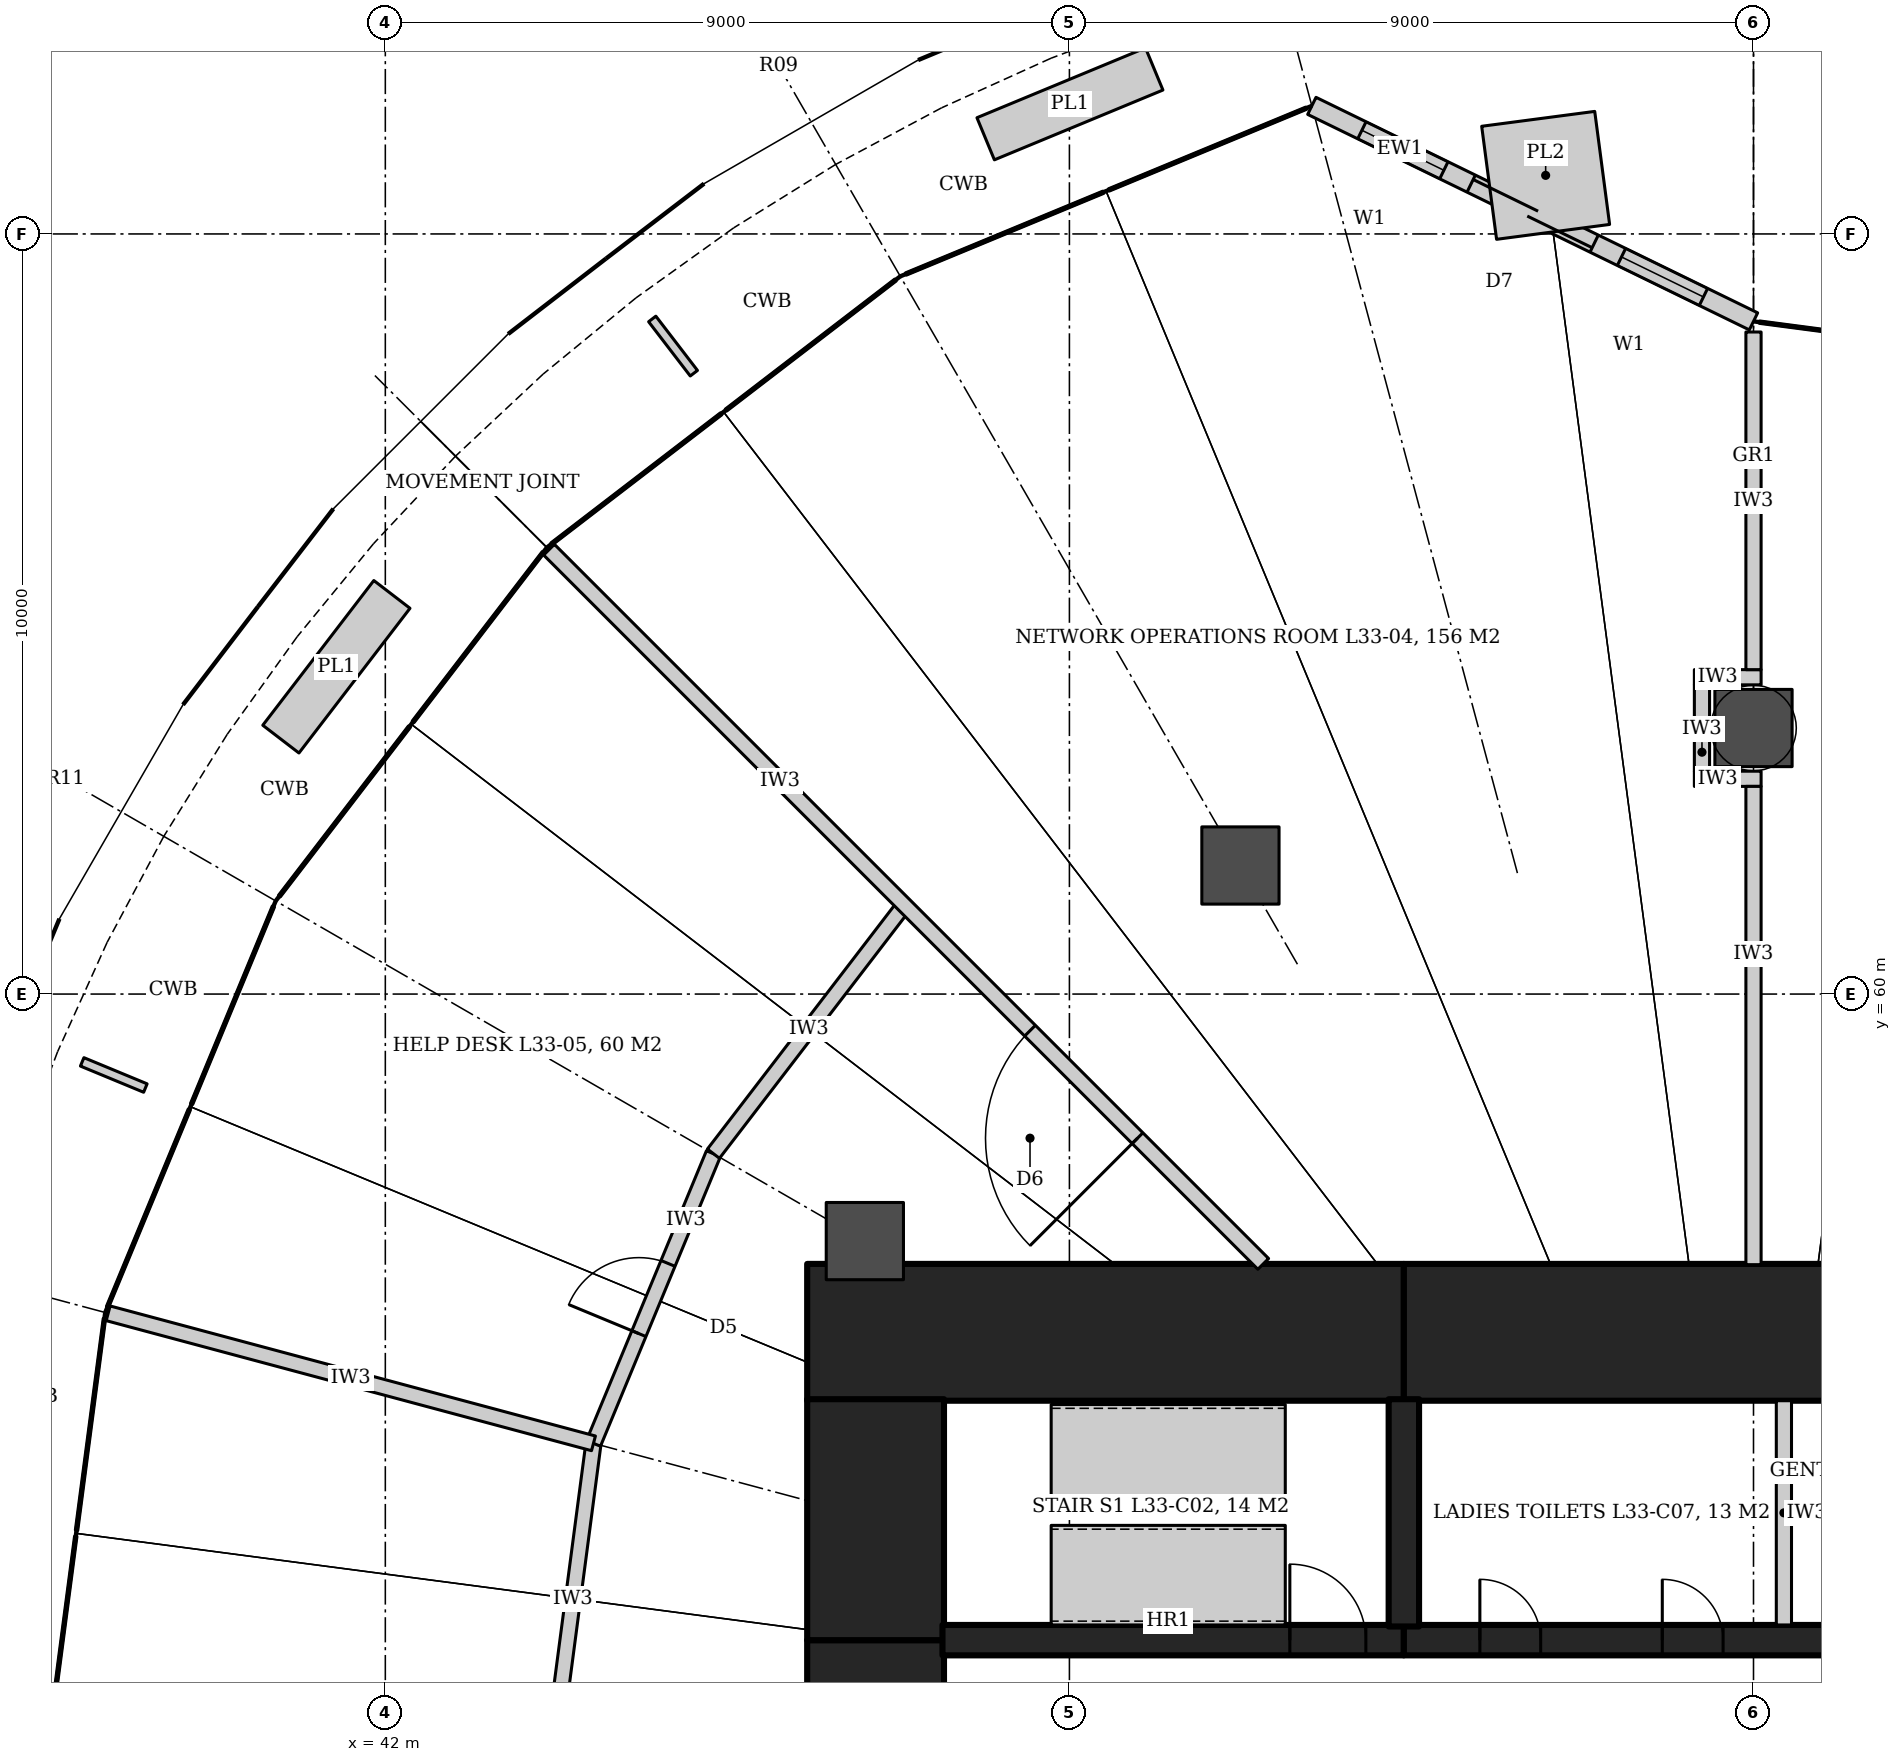
"""IFC4 building model, lengths in metres.
Left out: names, types, materials, properties, quantities, classifications, styles, units other than length and angle.
Written with IfcOpenShell. Run it as: python <this file> out.ifc"""

import sys

from ifc_helpers import new_model, si_unit, direction, frame, frame_2d, origin, origin_2d, place, context, subcontext, project, spatial, rectangle, hollow_circle, extrude, element, fill, save


model = new_model("IFC4")
c1 = context("Model", 3, precision=1e-05, world=origin(), true_north=direction((0.0, 1.0)))
c2 = subcontext(c1, "Body", "Model", "MODEL_VIEW")
j1 = project(units=[si_unit("LENGTHUNIT", "METRE"), si_unit("PLANEANGLEUNIT", "RADIAN")], contexts=[c1])
p1 = place(None, origin())
s1 = spatial("IfcSite", under=j1, at=p1, CompositionType="ELEMENT")
p2 = place(p1, origin())
s2 = spatial("IfcBuilding", under=s1, at=p2, CompositionType="ELEMENT")
p3 = place(p2, frame((0.0, 0.0, 147.8)))
s3 = spatial("IfcBuildingStorey", under=s2, at=p3, CompositionType="ELEMENT", Elevation=147.8)
p4 = place(p3, frame((47.55, 55.55, 0.0), z_axis=(0.0, 0.0, 1.0), x_axis=(1.0, 0.0, 0.0)))
e1 = element("IfcWall", 1, at=p4, inside=s3, PredefinedType="SHEAR", context=c2, shape_type="SweptSolid", body=[
    extrude(rectangle(XDim=7.85, YDim=1.8, at=frame_2d((3.925, 0.0))), origin(), (0.0, 0.0, 1.0), 4.2),
])
p5 = place(p3, frame((55.4, 55.55, 0.0), z_axis=(0.0, 0.0, 1.0), x_axis=(1.0, 0.0, 0.0)))
e2 = element("IfcWall", 2, at=p5, inside=s3, PredefinedType="SHEAR", context=c2, shape_type="SweptSolid", body=[
    extrude(rectangle(XDim=9.2, YDim=1.8, at=frame_2d((4.6, 0.0))), origin(), (0.0, 0.0, 1.0), 4.2),
])
p6 = place(p3, frame((48.45, 48.5, 0.0), z_axis=(0.0, 0.0, 1.0), x_axis=(0.0, 1.0, 0.0)))
e3 = element("IfcWall", 3, at=p6, inside=s3, PredefinedType="SHEAR", context=c2, shape_type="SweptSolid", body=[
    extrude(rectangle(XDim=3.0, YDim=1.8, at=frame_2d((1.5, 0.0))), origin(), (0.0, 0.0, 1.0), 4.2),
])
p7 = place(p6, frame((0.6, 0.0, 0.0)))
e4 = element("IfcOpeningElement", 4, at=p7, cuts=e3, PredefinedType="OPENING", context=c2, shape_type="SweptSolid", body=[
    extrude(rectangle(XDim=1.8, YDim=2.1, at=frame_2d((0.9, 1.05))), frame((0.0, 0.91, 0.0), z_axis=(0.0, -1.0, 0.0), x_axis=(1.0, 0.0, 0.0)), (0.0, 0.0, 1.0), 1.82),
])
p8 = place(p3, frame((48.45, 51.5, 0.0), z_axis=(0.0, 0.0, 1.0), x_axis=(0.0, 1.0, 0.0)))
e5 = element("IfcWall", 5, at=p8, inside=s3, PredefinedType="SHEAR", context=c2, shape_type="SweptSolid", body=[
    extrude(rectangle(XDim=3.17, YDim=1.8, at=frame_2d((1.585, 0.0))), origin(), (0.0, 0.0, 1.0), 4.2),
])
p9 = place(p3, frame((49.33, 51.5, 0.0), z_axis=(0.0, 0.0, 1.0), x_axis=(1.0, 0.0, 0.0)))
e6 = element("IfcWall", 6, at=p9, inside=s3, PredefinedType="SHEAR", context=c2, shape_type="SweptSolid", body=[
    extrude(rectangle(XDim=6.07, YDim=0.4, at=frame_2d((3.035, 0.0))), origin(), (0.0, 0.0, 1.0), 4.2),
])
p10 = place(p9, frame((4.57, 0.0, 0.0)))
e7 = element("IfcOpeningElement", 7, at=p10, cuts=e6, PredefinedType="OPENING", context=c2, shape_type="SweptSolid", body=[
    extrude(rectangle(XDim=1.0, YDim=2.1, at=frame_2d((0.5, 1.05))), frame((0.0, 0.21, 0.0), z_axis=(0.0, -1.0, 0.0), x_axis=(1.0, 0.0, 0.0)), (0.0, 0.0, 1.0), 0.42),
])
p11 = place(p3, frame((55.4, 51.5, 0.0), z_axis=(0.0, 0.0, 1.0), x_axis=(1.0, 0.0, 0.0)))
e8 = element("IfcWall", 8, at=p11, inside=s3, PredefinedType="SHEAR", context=c2, shape_type="SweptSolid", body=[
    extrude(rectangle(XDim=9.2, YDim=0.4, at=frame_2d((4.6, 0.0))), origin(), (0.0, 0.0, 1.0), 4.2),
])
p12 = place(p11, frame((1.0, 0.0, 0.0)))
e9 = element("IfcOpeningElement", 9, at=p12, cuts=e8, PredefinedType="OPENING", context=c2, shape_type="SweptSolid", body=[
    extrude(rectangle(XDim=0.8, YDim=2.1, at=frame_2d((0.4, 1.05))), frame((0.0, 0.21, 0.0), z_axis=(0.0, -1.0, 0.0), x_axis=(1.0, 0.0, 0.0)), (0.0, 0.0, 1.0), 0.42),
])
p13 = place(p11, frame((3.4, 0.0, 0.0)))
e10 = element("IfcOpeningElement", 10, at=p13, cuts=e8, PredefinedType="OPENING", context=c2, shape_type="SweptSolid", body=[
    extrude(rectangle(XDim=0.8, YDim=2.1, at=frame_2d((0.4, 1.05))), frame((0.0, 0.21, 0.0), z_axis=(0.0, -1.0, 0.0), x_axis=(1.0, 0.0, 0.0)), (0.0, 0.0, 1.0), 0.42),
])
p14 = place(p11, frame((6.6, 0.0, 0.0)))
e11 = element("IfcOpeningElement", 11, at=p14, cuts=e8, PredefinedType="OPENING", context=c2, shape_type="SweptSolid", body=[
    extrude(rectangle(XDim=0.8, YDim=2.1, at=frame_2d((0.4, 1.05))), frame((0.0, 0.21, 0.0), z_axis=(0.0, -1.0, 0.0), x_axis=(1.0, 0.0, 0.0)), (0.0, 0.0, 1.0), 0.42),
])
p15 = place(p3, frame((55.4, 51.68, 0.0), z_axis=(0.0, 0.0, 1.0), x_axis=(0.0, 1.0, 0.0)))
e12 = element("IfcWall", 12, at=p15, inside=s3, PredefinedType="SHEAR", context=c2, shape_type="SweptSolid", body=[
    extrude(rectangle(XDim=2.99, YDim=0.4, at=frame_2d((1.495, 0.0))), origin(), (0.0, 0.0, 1.0), 4.2),
])
for number, where, z_axis, x_axis in (
    (13, (60.0, 63.5, 0.0), (0.0, 0.0, 1.0), (1.0, 0.0, 0.0)),
    (14, (53.25, 61.691, 0.0), (0.0, 0.0, 1.0), (1.0, 0.0, 0.0)),
    (15, (48.309, 56.75, 0.0), (0.0, 0.0, 1.0), (1.0, 0.0, 0.0)),
):
    element("IfcColumn", number, at=place(p3, frame(where, z_axis=z_axis, x_axis=x_axis)), inside=s3, PredefinedType="COLUMN", context=c2, shape_type="SweptSolid", body=[
        extrude(hollow_circle(Radius=0.508, WallThickness=0.05, at=origin_2d()), origin(), (0.0, 0.0, 1.0), 4.2),
    ])
p16 = place(p3, frame((44.2, 50.0, 0.0), z_axis=(0.0, 0.0, 1.0), x_axis=(0.130515758099, 0.991446234996, 0.0)))
e16 = element("IfcWall", 16, at=p16, inside=s3, PredefinedType="PARTITIONING", context=c2, shape_type="SweptSolid", body=[
    extrude(rectangle(XDim=4.125, YDim=0.2, at=frame_2d((2.062, 0.0))), origin(), (0.0, 0.0, 1.0), 3.04),
])
p17 = place(p3, frame((44.738, 54.089, 0.0), z_axis=(0.0, 0.0, 1.0), x_axis=(0.382731667114, 0.923859551549, 0.0)))
e17 = element("IfcWall", 17, at=p17, inside=s3, PredefinedType="PARTITIONING", context=c2, shape_type="SweptSolid", body=[
    extrude(rectangle(XDim=4.125, YDim=0.2, at=frame_2d((2.062, 0.0))), origin(), (0.0, 0.0, 1.0), 3.04),
])
p18 = place(p17, frame((1.562, 0.0, 0.0)))
e18 = element("IfcOpeningElement", 18, at=p18, cuts=e17, PredefinedType="OPENING", context=c2, shape_type="SweptSolid", body=[
    extrude(rectangle(XDim=1.0, YDim=2.1, at=frame_2d((0.5, 1.05))), frame((0.0, 0.11, 0.0), z_axis=(0.0, -1.0, 0.0), x_axis=(1.0, 0.0, 0.0)), (0.0, 0.0, 1.0), 0.22),
])
p19 = place(p3, frame((46.317, 57.9, 0.0), z_axis=(0.0, 0.0, 1.0), x_axis=(0.608714823874, 0.793389099494, 0.0)))
e19 = element("IfcWall", 19, at=p19, inside=s3, PredefinedType="PARTITIONING", context=c2, shape_type="SweptSolid", body=[
    extrude(rectangle(XDim=4.125, YDim=0.2, at=frame_2d((2.062, 0.0))), origin(), (0.0, 0.0, 1.0), 3.04),
])
for number, where, z_axis, x_axis in (
    (20, (60.1, 62.832, 0.0), (0.0, 0.0, 1.0), (-1.0, 0.0, 0.0)),
    (21, (60.1, 64.168, 0.0), (0.0, 0.0, 1.0), (-1.0, 0.0, 0.0)),
):
    element("IfcWall", number, at=place(p3, frame(where, z_axis=z_axis, x_axis=x_axis)), inside=s3, PredefinedType="PARTITIONING", context=c2, shape_type="SweptSolid", body=[
        extrude(rectangle(XDim=0.878, YDim=0.2, at=frame_2d((0.439, 0.0))), origin(), (0.0, 0.0, 1.0), 3.02),
    ])
p20 = place(p3, frame((59.322, 62.932, 0.0), z_axis=(0.0, 0.0, 1.0), x_axis=(0.0, 1.0, 0.0)))
e22 = element("IfcWall", 22, at=p20, inside=s3, PredefinedType="PARTITIONING", context=c2, shape_type="SweptSolid", body=[
    extrude(rectangle(XDim=1.136, YDim=0.2, at=frame_2d((0.568, 0.0))), origin(), (0.0, 0.0, 1.0), 3.02),
])
p21 = place(p3, frame((60.0, 56.44, 0.0), z_axis=(0.0, 0.0, 1.0), x_axis=(0.0, 1.0, 0.0)))
e23 = element("IfcWall", 23, at=p21, inside=s3, PredefinedType="PARTITIONING", context=c2, shape_type="SweptSolid", body=[
    extrude(rectangle(XDim=6.292, YDim=0.2, at=frame_2d((3.146, 0.0))), origin(), (0.0, 0.0, 1.0), 3.04),
])
p22 = place(p3, frame((60.0, 64.268, 0.0), z_axis=(0.0, 0.0, 1.0), x_axis=(0.0, 1.0, 0.0)))
e24 = element("IfcWall", 24, at=p22, inside=s3, PredefinedType="PARTITIONING", context=c2, shape_type="SweptSolid", body=[
    extrude(rectangle(XDim=4.442, YDim=0.2, at=frame_2d((2.221, 0.0))), origin(), (0.0, 0.0, 1.0), 3.04),
])
p23 = place(p3, frame((53.55, 56.45, 0.0), z_axis=(0.0, 0.0, 1.0), x_axis=(-0.707106781187, 0.707106781187, 0.0)))
e25 = element("IfcWall", 25, at=p23, inside=s3, PredefinedType="PARTITIONING", context=c2, shape_type="SweptSolid", body=[
    extrude(rectangle(XDim=13.288, YDim=0.2, at=frame_2d((6.644, 0.0))), origin(), (0.0, 0.0, 1.0), 3.02),
])
p24 = place(p23, frame((2.339, 0.0, 0.0)))
e26 = element("IfcOpeningElement", 26, at=p24, cuts=e25, PredefinedType="OPENING", context=c2, shape_type="SweptSolid", body=[
    extrude(rectangle(XDim=2.0, YDim=2.1, at=frame_2d((1.0, 1.05))), frame((0.0, 0.11, 0.0), z_axis=(0.0, -1.0, 0.0), x_axis=(1.0, 0.0, 0.0)), (0.0, 0.0, 1.0), 0.22),
])
p25 = place(p3, frame((44.738, 54.089, 0.0), z_axis=(0.0, 0.0, 1.0), x_axis=(-0.965929586934, 0.258805009775, 0.0)))
e27 = element("IfcWall", 27, at=p25, inside=s3, PredefinedType="PARTITIONING", context=c2, shape_type="SweptSolid", body=[
    extrude(rectangle(XDim=6.61, YDim=0.2, at=frame_2d((3.305, 0.0))), origin(), (0.0, 0.0, 1.0), 3.04),
])
p26 = place(p3, frame((60.0, 68.85, 0.0), z_axis=(0.0, 0.0, 1.0), x_axis=(-0.898735054264, 0.438492077736, 0.0)))
e28 = element("IfcWall", 28, at=p26, inside=s3, PredefinedType="SOLIDWALL", context=c2, shape_type="SweptSolid", body=[
    extrude(rectangle(XDim=6.465, YDim=0.25, at=frame_2d((3.233, 0.0))), origin(), (0.0, 0.0, 1.0), 4.04),
])
p27 = place(p26, frame((2.333, 0.0, 0.0)))
e29 = element("IfcOpeningElement", 29, at=p27, cuts=e28, PredefinedType="OPENING", context=c2, shape_type="SweptSolid", body=[
    extrude(rectangle(XDim=1.8, YDim=2.4, at=frame_2d((0.9, 1.2))), frame((0.0, 0.135, 0.0), z_axis=(0.0, -1.0, 0.0), x_axis=(1.0, 0.0, 0.0)), (0.0, 0.0, 1.0), 0.27),
])
p28 = place(p26, frame((0.733, 0.0, 0.0)))
e30 = element("IfcOpeningElement", 30, at=p28, cuts=e28, PredefinedType="OPENING", context=c2, shape_type="SweptSolid", body=[
    extrude(rectangle(XDim=1.2, YDim=2.4, at=frame_2d((0.6, 1.2))), frame((0.0, 0.135, 0.0), z_axis=(0.0, -1.0, 0.0), x_axis=(1.0, 0.0, 0.0)), (0.0, 0.0, 1.0), 0.27),
])
p29 = place(p26, frame((4.533, 0.0, 0.0)))
e31 = element("IfcOpeningElement", 31, at=p29, cuts=e28, PredefinedType="OPENING", context=c2, shape_type="SweptSolid", body=[
    extrude(rectangle(XDim=1.2, YDim=2.4, at=frame_2d((0.6, 1.2))), frame((0.0, 0.135, 0.0), z_axis=(0.0, -1.0, 0.0), x_axis=(1.0, 0.0, 0.0)), (0.0, 0.0, 1.0), 0.27),
])
p30 = place(p3, frame((60.4, 51.7, 0.0), z_axis=(0.0, 0.0, 1.0), x_axis=(0.0, 1.0, 0.0)))
e32 = element("IfcWall", 32, at=p30, inside=s3, PredefinedType="PARTITIONING", context=c2, shape_type="SweptSolid", body=[
    extrude(rectangle(XDim=2.95, YDim=0.2, at=frame_2d((1.475, 0.0))), origin(), (0.0, 0.0, 1.0), 4.04),
])
p31 = place(p24, origin())
e33 = element("IfcDoor", 33, at=p31, inside=s3, OperationType="DOUBLE_DOOR_DOUBLE_SWING", PredefinedType="DOOR", context=c2, shape_type="SweptSolid", body=[
    extrude(rectangle(XDim=2.0, YDim=2.1, at=frame_2d((1.0, 1.05))), frame((0.0, 0.025, 0.0), z_axis=(0.0, -1.0, 0.0), x_axis=(1.0, 0.0, 0.0)), (0.0, 0.0, 1.0), 0.05),
])
fill(e26, e33)
p32 = place(p18, origin())
e34 = element("IfcDoor", 34, at=p32, inside=s3, OperationType="SINGLE_SWING_LEFT", PredefinedType="DOOR", context=c2, shape_type="SweptSolid", body=[
    extrude(rectangle(XDim=1.0, YDim=2.1, at=frame_2d((0.5, 1.05))), frame((0.0, 0.025, 0.0), z_axis=(0.0, -1.0, 0.0), x_axis=(1.0, 0.0, 0.0)), (0.0, 0.0, 1.0), 0.05),
])
fill(e18, e34)
p33 = place(p27, origin())
e35 = element("IfcDoor", 35, at=p33, inside=s3, OperationType="DOUBLE_DOOR_SLIDING", PredefinedType="DOOR", context=c2, shape_type="SweptSolid", body=[
    extrude(rectangle(XDim=1.8, YDim=2.4, at=frame_2d((0.9, 1.2))), frame((0.0, 0.025, 0.0), z_axis=(0.0, -1.0, 0.0), x_axis=(1.0, 0.0, 0.0)), (0.0, 0.0, 1.0), 0.05),
])
fill(e29, e35)
p34 = place(p28, origin())
e36 = element("IfcWindow", 36, at=p34, inside=s3, PartitioningType="SINGLE_PANEL", PredefinedType="WINDOW", context=c2, shape_type="SweptSolid", body=[
    extrude(rectangle(XDim=1.2, YDim=2.4, at=frame_2d((0.6, 1.2))), frame((0.0, 0.03, 0.0), z_axis=(0.0, -1.0, 0.0), x_axis=(1.0, 0.0, 0.0)), (0.0, 0.0, 1.0), 0.06),
])
fill(e30, e36)
p35 = place(p29, origin())
e37 = element("IfcWindow", 37, at=p35, inside=s3, PartitioningType="SINGLE_PANEL", PredefinedType="WINDOW", context=c2, shape_type="SweptSolid", body=[
    extrude(rectangle(XDim=1.2, YDim=2.4, at=frame_2d((0.6, 1.2))), frame((0.0, 0.03, 0.0), z_axis=(0.0, -1.0, 0.0), x_axis=(1.0, 0.0, 0.0)), (0.0, 0.0, 1.0), 0.06),
])
fill(e31, e37)
p36 = place(p10, origin())
e38 = element("IfcDoor", 38, at=p36, inside=s3, OperationType="SINGLE_SWING_LEFT", PredefinedType="DOOR", context=c2, shape_type="SweptSolid", body=[
    extrude(rectangle(XDim=1.0, YDim=2.1, at=frame_2d((0.5, 1.05))), frame((0.0, 0.025, 0.0), z_axis=(0.0, -1.0, 0.0), x_axis=(1.0, 0.0, 0.0)), (0.0, 0.0, 1.0), 0.05),
])
fill(e7, e38)
p37 = place(p12, origin())
e39 = element("IfcDoor", 39, at=p37, inside=s3, OperationType="SINGLE_SWING_LEFT", PredefinedType="DOOR", context=c2, shape_type="SweptSolid", body=[
    extrude(rectangle(XDim=0.8, YDim=2.1, at=frame_2d((0.4, 1.05))), frame((0.0, 0.025, 0.0), z_axis=(0.0, -1.0, 0.0), x_axis=(1.0, 0.0, 0.0)), (0.0, 0.0, 1.0), 0.05),
])
fill(e9, e39)
p38 = place(p13, origin())
e40 = element("IfcDoor", 40, at=p38, inside=s3, OperationType="SINGLE_SWING_LEFT", PredefinedType="DOOR", context=c2, shape_type="SweptSolid", body=[
    extrude(rectangle(XDim=0.8, YDim=2.1, at=frame_2d((0.4, 1.05))), frame((0.0, 0.025, 0.0), z_axis=(0.0, -1.0, 0.0), x_axis=(1.0, 0.0, 0.0)), (0.0, 0.0, 1.0), 0.05),
])
fill(e10, e40)
save(model, sys.argv[1])
